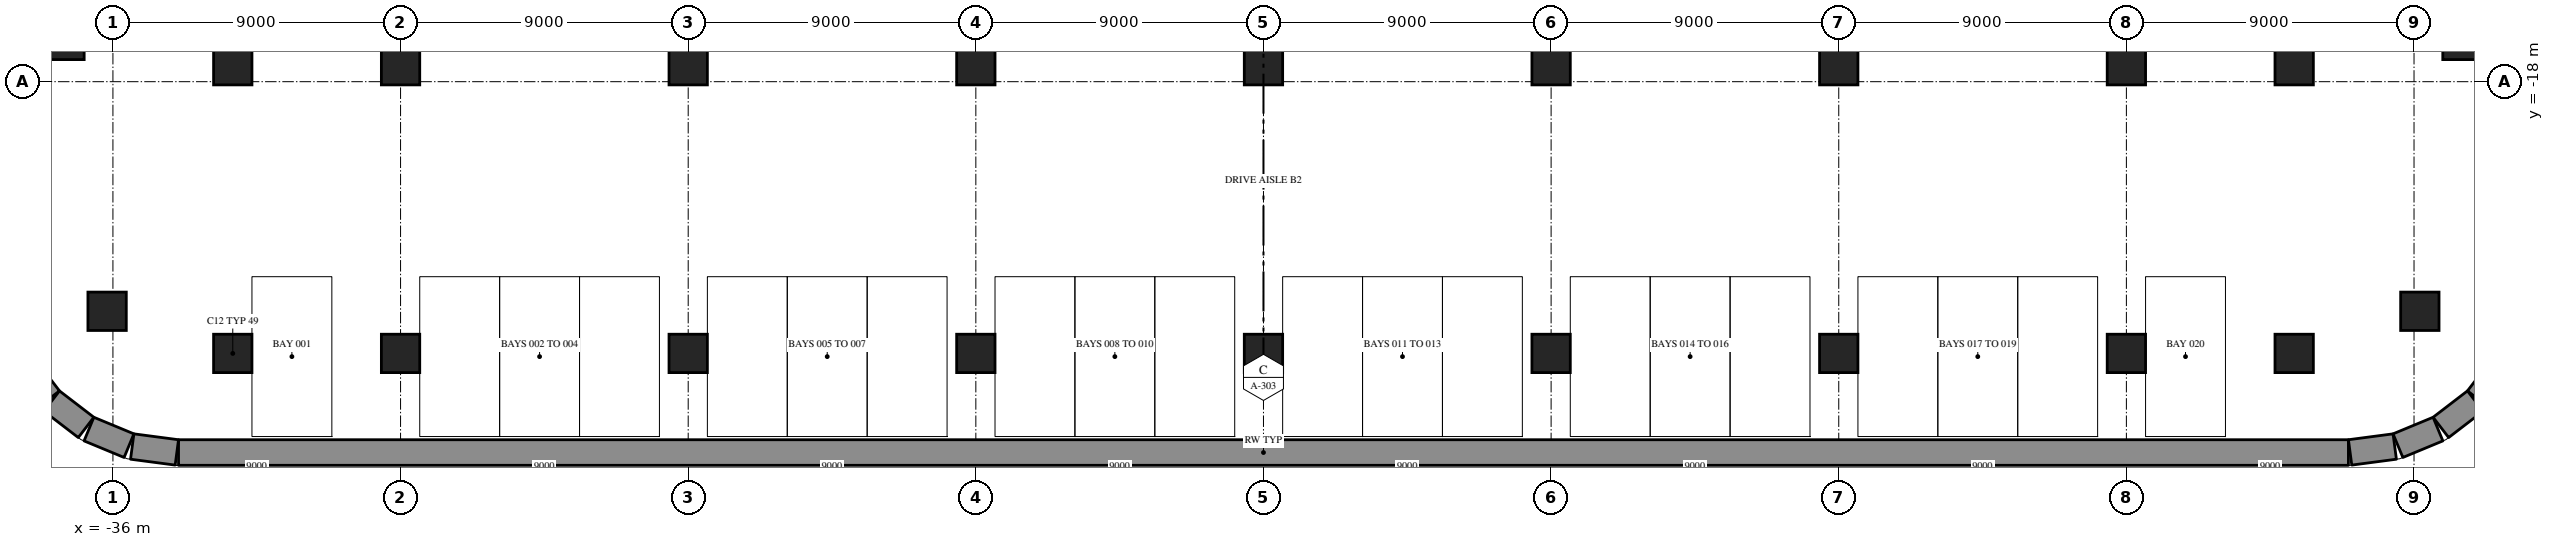
"""IFC4 building model, lengths in metres.
Left out: names, types, materials, properties, quantities, classifications, styles, units other than length and angle.
Written with IfcOpenShell. Run it as: python <this file> out.ifc"""

import sys

from ifc_helpers import new_model, si_unit, direction, frame, frame_2d, origin, origin_2d, place, context, subcontext, project, spatial, rectangle, extrude, element, save


model = new_model("IFC4")
c1 = context("Model", 3, precision=1e-05, world=origin(), true_north=direction((0.0, 1.0)))
c2 = subcontext(c1, "Body", "Model", "MODEL_VIEW")
j1 = project(units=[si_unit("LENGTHUNIT", "METRE"), si_unit("PLANEANGLEUNIT", "RADIAN")], contexts=[c1])
p1 = place(None, origin())
s1 = spatial("IfcSite", under=j1, at=p1, CompositionType="ELEMENT")
p2 = place(p1, origin())
s2 = spatial("IfcBuilding", under=s1, at=p2, CompositionType="ELEMENT")
p3 = place(p2, frame((0.0, 0.0, -8.4)))
s3 = spatial("IfcBuildingStorey", under=s2, at=p3, CompositionType="ELEMENT", Elevation=-8.4)
p4 = place(p3, frame((33.948, -29.6, 0.0), z_axis=(0.0, 0.0, 1.0), x_axis=(-1.0, 0.0, 0.0)))
e1 = element("IfcWall", 1, at=p4, inside=s3, PredefinedType="SOLIDWALL", context=c2, shape_type="SweptSolid", body=[
    extrude(rectangle(XDim=67.895, YDim=0.8, at=frame_2d((33.948, 0.0))), origin(), (0.0, 0.0, 1.0), 4.2),
])
p5 = place(p3, frame((-34.0, -29.597, 0.0), z_axis=(0.0, 0.0, 1.0), x_axis=(-0.99144603414, 0.130517283865, 0.0)))
e2 = element("IfcWall", 2, at=p5, inside=s3, PredefinedType="SOLIDWALL", context=c2, shape_type="SweptSolid", body=[
    extrude(rectangle(XDim=1.408, YDim=0.8, at=frame_2d((0.704, 0.0))), origin(), (0.0, 0.0, 1.0), 4.2),
])
for number, where, z_axis, x_axis in (
    (3, (-35.497, -29.386, 0.0), (0.0, 0.0, 1.0), (-0.924, 0.383, 0.0)),
    (4, (-36.84, -28.815, 0.0), (0.0, 0.0, 1.0), (-0.793, 0.609, 0.0)),
    (5, (-37.99, -27.916, 0.0), (0.0, 0.0, 1.0), (-0.609, 0.793, 0.0)),
    (6, (38.815, -26.84, 0.0), (0.0, 0.0, 1.0), (-0.609, -0.793, 0.0)),
    (7, (37.916, -27.99, 0.0), (0.0, 0.0, 1.0), (-0.793, -0.609, 0.0)),
    (8, (36.75, -28.867, 0.0), (0.0, 0.0, 1.0), (-0.924, -0.383, 0.0)),
):
    element("IfcWall", number, at=place(p3, frame(where, z_axis=z_axis, x_axis=x_axis)), inside=s3, PredefinedType="SOLIDWALL", context=c2, shape_type="SweptSolid", body=[
        extrude(rectangle(XDim=1.355, YDim=0.8, at=frame_2d((0.678, 0.0))), origin(), (0.0, 0.0, 1.0), 4.2),
    ])
p6 = place(p3, frame((35.396, -29.413, 0.0), z_axis=(0.0, 0.0, 1.0), x_axis=(-0.99144603414, -0.130517283865, 0.0)))
e9 = element("IfcWall", 9, at=p6, inside=s3, PredefinedType="SOLIDWALL", context=c2, shape_type="SweptSolid", body=[
    extrude(rectangle(XDim=1.408, YDim=0.8, at=frame_2d((0.704, 0.0))), origin(), (0.0, 0.0, 1.0), 4.2),
])
for number, where, z_axis, x_axis in (
    (10, (-32.25, -26.5, 0.0), (0.0, 0.0, 1.0), (1.0, 0.0, 0.0)),
    (11, (-27.0, -26.5, 0.0), (0.0, 0.0, 1.0), (1.0, 0.0, 0.0)),
    (12, (-18.0, -26.5, 0.0), (0.0, 0.0, 1.0), (1.0, 0.0, 0.0)),
    (13, (-9.0, -26.5, 0.0), (0.0, 0.0, 1.0), (1.0, 0.0, 0.0)),
    (14, (0.0, -26.5, 0.0), (0.0, 0.0, 1.0), (1.0, 0.0, 0.0)),
    (15, (9.0, -26.5, 0.0), (0.0, 0.0, 1.0), (1.0, 0.0, 0.0)),
    (16, (18.0, -26.5, 0.0), (0.0, 0.0, 1.0), (1.0, 0.0, 0.0)),
    (17, (27.0, -26.5, 0.0), (0.0, 0.0, 1.0), (1.0, 0.0, 0.0)),
    (18, (32.25, -26.5, 0.0), (0.0, 0.0, 1.0), (1.0, 0.0, 0.0)),
    (19, (-36.182, -25.182, 0.0), (0.0, 0.0, 1.0), (1.0, 0.0, 0.0)),
    (20, (36.182, -25.182, 0.0), (0.0, 0.0, 1.0), (1.0, 0.0, 0.0)),
    (21, (-32.25, -17.5, 0.0), (0.0, 0.0, 1.0), (1.0, 0.0, 0.0)),
    (22, (-27.0, -17.5, 0.0), (0.0, 0.0, 1.0), (1.0, 0.0, 0.0)),
    (23, (-18.0, -17.5, 0.0), (0.0, 0.0, 1.0), (1.0, 0.0, 0.0)),
    (24, (-9.0, -17.5, 0.0), (0.0, 0.0, 1.0), (1.0, 0.0, 0.0)),
    (25, (0.0, -17.5, 0.0), (0.0, 0.0, 1.0), (1.0, 0.0, 0.0)),
    (26, (9.0, -17.5, 0.0), (0.0, 0.0, 1.0), (1.0, 0.0, 0.0)),
    (27, (18.0, -17.5, 0.0), (0.0, 0.0, 1.0), (1.0, 0.0, 0.0)),
    (28, (27.0, -17.5, 0.0), (0.0, 0.0, 1.0), (1.0, 0.0, 0.0)),
    (29, (32.25, -17.5, 0.0), (0.0, 0.0, 1.0), (1.0, 0.0, 0.0)),
    (30, (-37.5, -16.709, 0.0), (0.0, 0.0, 1.0), (1.0, 0.0, 0.0)),
    (31, (37.5, -16.709, 0.0), (0.0, 0.0, 1.0), (1.0, 0.0, 0.0)),
):
    element("IfcColumn", number, at=place(p3, frame(where, z_axis=z_axis, x_axis=x_axis)), inside=s3, PredefinedType="COLUMN", context=c2, shape_type="SweptSolid", body=[
        extrude(rectangle(XDim=1.2, YDim=1.2, at=origin_2d()), origin(), (0.0, 0.0, 1.0), 4.2),
    ])
save(model, sys.argv[1])
